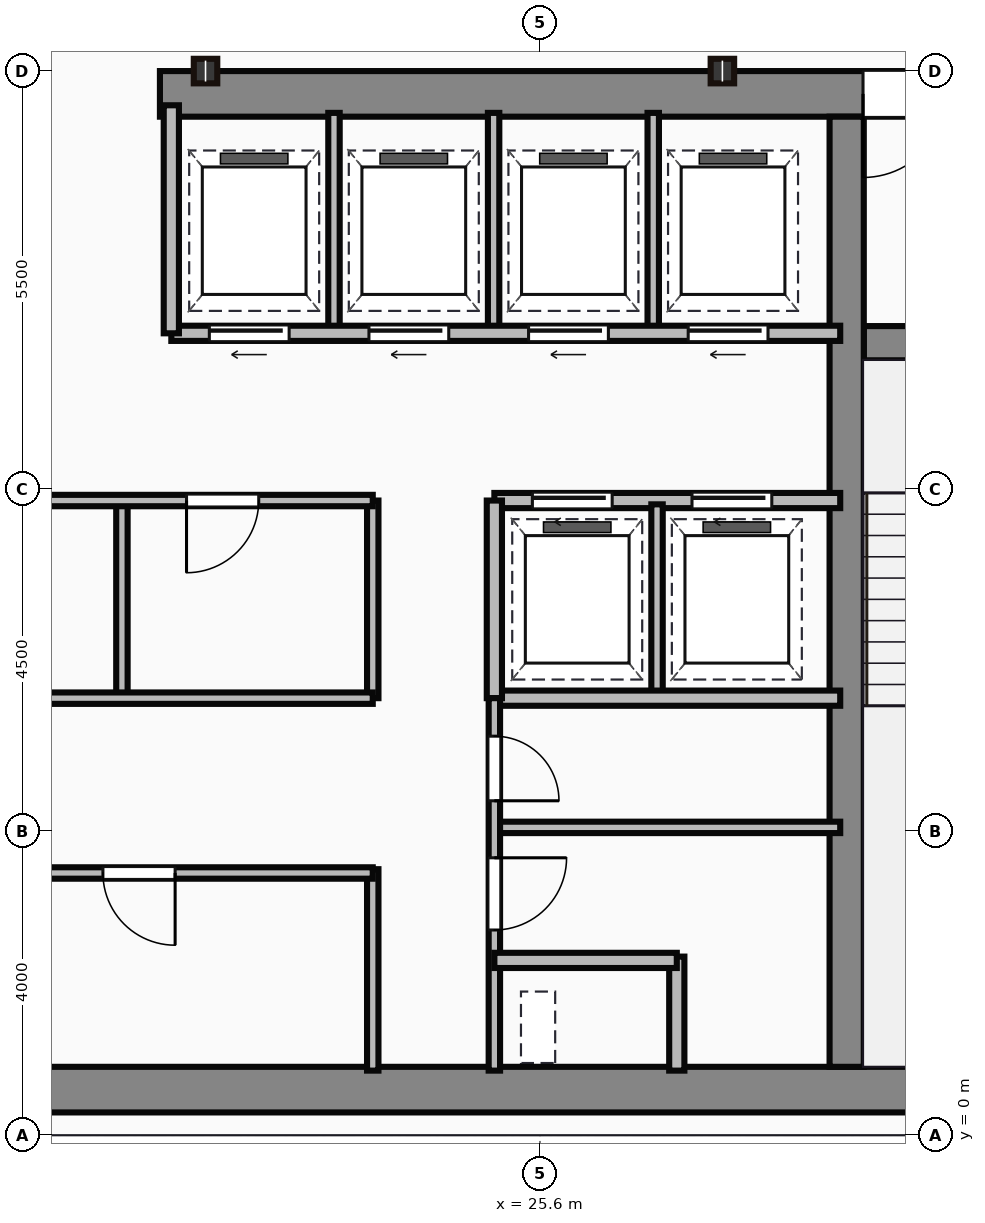
"""IFC4 building model, lengths in metres.
Left out: names, types, materials, properties, quantities, classifications, styles, units other than length and angle.
Written with IfcOpenShell. Run it as: python <this file> out.ifc"""

import sys

from ifc_helpers import new_model, si_unit, direction, frame, frame_2d, origin, origin_2d, place, context, subcontext, project, spatial, rectangle, i_section, extrude, source, transform, mapped, element, fill, save


model = new_model("IFC4")
c1 = context("Model", 3, precision=1e-05, world=origin(), true_north=direction((0.0, 1.0)))
c2 = subcontext(c1, "Body", "Model", "MODEL_VIEW")
j1 = project(units=[si_unit("LENGTHUNIT", "METRE"), si_unit("PLANEANGLEUNIT", "RADIAN")], contexts=[c1])
p1 = place(None, origin())
s1 = spatial("IfcSite", under=j1, at=p1, CompositionType="ELEMENT")
p2 = place(p1, origin())
s2 = spatial("IfcBuilding", under=s1, at=p2, CompositionType="ELEMENT")
p3 = place(p2, frame((0.0, 0.0, 195.9)))
s3 = spatial("IfcBuildingStorey", under=s2, at=p3, CompositionType="ELEMENT", Elevation=195.9)
m1 = source(origin(), c2, "Body", "SweptSolid", [
    extrude(rectangle(XDim=29.5, YDim=0.6, at=frame_2d((14.75, 0.0))), origin(), (0.0, 0.0, 1.0), 3.65),
])
p4 = place(p3, frame((4.5, 0.6, 0.0), z_axis=(0.0, 0.0, 1.0), x_axis=(1.0, 0.0, 0.0)))
e1 = element("IfcWall", 1, at=p4, inside=s3, PredefinedType="SHEAR", context=c2, shape_type="MappedRepresentation", body=[
    mapped(m1, transform((0.0, 0.0, 0.0))),
])
m2 = source(origin(), c2, "Body", "SweptSolid", [
    extrude(rectangle(XDim=12.6, YDim=0.6, at=frame_2d((6.3, 0.0))), origin(), (0.0, 0.0, 1.0), 3.65),
])
p5 = place(p3, frame((20.6, 13.7, 0.0), z_axis=(0.0, 0.0, 1.0), x_axis=(1.0, 0.0, 0.0)))
e2 = element("IfcWall", 2, at=p5, inside=s3, PredefinedType="SHEAR", context=c2, shape_type="MappedRepresentation", body=[
    mapped(m2, transform((0.0, 0.0, 0.0))),
])
p6 = place(p5, frame((9.25, 0.0, 0.0)))
e3 = element("IfcOpeningElement", 3, at=p6, cuts=e2, PredefinedType="OPENING", context=c2, shape_type="SweptSolid", body=[
    extrude(rectangle(XDim=1.1, YDim=2.15, at=frame_2d((0.55, 1.075))), frame((0.0, 0.31, 0.0), z_axis=(0.0, -1.0, 0.0), x_axis=(1.0, 0.0, 0.0)), (0.0, 0.0, 1.0), 0.62),
])
m3 = source(origin(), c2, "Body", "SweptSolid", [
    extrude(rectangle(XDim=12.5, YDim=0.45, at=frame_2d((6.25, 0.0))), origin(), (0.0, 0.0, 1.0), 3.65),
])
p7 = place(p3, frame((29.635, 0.9, 0.0), z_axis=(0.0, 0.0, 1.0), x_axis=(0.0, 1.0, 0.0)))
e4 = element("IfcWall", 4, at=p7, inside=s3, PredefinedType="SHEAR", context=c2, shape_type="MappedRepresentation", body=[
    mapped(m3, transform((0.0, 0.0, 0.0))),
])
m4 = source(origin(), c2, "Body", "SweptSolid", [
    extrude(rectangle(XDim=3.39, YDim=0.45, at=frame_2d((1.695, 0.0))), origin(), (0.0, 0.0, 1.0), 3.65),
])
p8 = place(p3, frame((29.86, 10.42, 0.0), z_axis=(0.0, 0.0, 1.0), x_axis=(1.0, 0.0, 0.0)))
e5 = element("IfcWall", 5, at=p8, inside=s3, PredefinedType="SHEAR", context=c2, shape_type="MappedRepresentation", body=[
    mapped(m4, transform((0.0, 0.0, 0.0))),
])
p9 = place(p8, frame((1.1, 0.0, 0.0)))
e6 = element("IfcOpeningElement", 6, at=p9, cuts=e5, PredefinedType="OPENING", context=c2, shape_type="SweptSolid", body=[
    extrude(rectangle(XDim=1.1, YDim=2.15, at=frame_2d((0.55, 1.075))), frame((0.0, 0.235, 0.0), z_axis=(0.0, -1.0, 0.0), x_axis=(1.0, 0.0, 0.0)), (0.0, 0.0, 1.0), 0.47),
])
m5 = source(origin(), c2, "Body", "SweptSolid", [
    extrude(i_section(OverallWidth=0.309, OverallDepth=0.323, WebThickness=0.014, FlangeThickness=0.023, at=origin_2d()), origin(), (0.0, 0.0, 1.0), 3.65),
])
for number, where, z_axis, x_axis in (
    (7, (21.2, 14.0, 0.0), (0.0, 0.0, 1.0), (1.0, 0.0, 0.0)),
    (8, (28.0, 14.0, 0.0), (0.0, 0.0, 1.0), (1.0, 0.0, 0.0)),
):
    element("IfcColumn", number, at=place(p3, frame(where, z_axis=z_axis, x_axis=x_axis)), inside=s3, PredefinedType="COLUMN", context=c2, shape_type="MappedRepresentation", body=[
        mapped(m5, transform((0.0, 0.0, 0.0))),
    ])
m6 = source(origin(), c2, "Body", "SweptSolid", [
    extrude(rectangle(XDim=10.35, YDim=0.15, at=frame_2d((5.175, 0.0))), origin(), (0.0, 0.0, 1.0), 3.4),
])
p10 = place(p3, frame((13.05, 3.45, 0.0), z_axis=(0.0, 0.0, 1.0), x_axis=(1.0, 0.0, 0.0)))
e9 = element("IfcWall", 9, at=p10, inside=s3, PredefinedType="PARTITIONING", context=c2, shape_type="MappedRepresentation", body=[
    mapped(m6, transform((0.0, 0.0, 0.0))),
])
p11 = place(p10, frame((0.25, 0.0, 0.0)))
e10 = element("IfcOpeningElement", 10, at=p11, cuts=e9, PredefinedType="OPENING", context=c2, shape_type="SweptSolid", body=[
    extrude(rectangle(XDim=0.95, YDim=2.15, at=frame_2d((0.475, 1.075))), frame((0.0, 0.085, 0.0), z_axis=(0.0, -1.0, 0.0), x_axis=(1.0, 0.0, 0.0)), (0.0, 0.0, 1.0), 0.17),
])
p12 = place(p10, frame((6.8, 0.0, 0.0)))
e11 = element("IfcOpeningElement", 11, at=p12, cuts=e9, PredefinedType="OPENING", context=c2, shape_type="SweptSolid", body=[
    extrude(rectangle(XDim=0.95, YDim=2.15, at=frame_2d((0.475, 1.075))), frame((0.0, 0.085, 0.0), z_axis=(0.0, -1.0, 0.0), x_axis=(1.0, 0.0, 0.0)), (0.0, 0.0, 1.0), 0.17),
])
m7 = source(origin(), c2, "Body", "SweptSolid", [
    extrude(rectangle(XDim=2.65, YDim=0.15, at=frame_2d((1.325, 0.0))), origin(), (0.0, 0.0, 1.0), 3.4),
])
p13 = place(p3, frame((23.4, 0.85, 0.0), z_axis=(0.0, 0.0, 1.0), x_axis=(0.0, 1.0, 0.0)))
e12 = element("IfcWall", 12, at=p13, inside=s3, PredefinedType="PARTITIONING", context=c2, shape_type="MappedRepresentation", body=[
    mapped(m7, transform((0.0, 0.0, 0.0))),
])
m8 = source(origin(), c2, "Body", "SweptSolid", [
    extrude(rectangle(XDim=11.85, YDim=0.15, at=frame_2d((5.925, 0.0))), origin(), (0.0, 0.0, 1.0), 3.4),
])
p14 = place(p3, frame((11.55, 5.75, 0.0), z_axis=(0.0, 0.0, 1.0), x_axis=(1.0, 0.0, 0.0)))
e13 = element("IfcWall", 13, at=p14, inside=s3, PredefinedType="PARTITIONING", context=c2, shape_type="MappedRepresentation", body=[
    mapped(m8, transform((0.0, 0.0, 0.0))),
])
p15 = place(p3, frame((11.55, 8.35, 0.0), z_axis=(0.0, 0.0, 1.0), x_axis=(1.0, 0.0, 0.0)))
e14 = element("IfcWall", 14, at=p15, inside=s3, PredefinedType="PARTITIONING", context=c2, shape_type="MappedRepresentation", body=[
    mapped(m8, transform((0.0, 0.0, 0.0))),
])
p16 = place(p15, frame((1.1, 0.0, 0.0)))
e15 = element("IfcOpeningElement", 15, at=p16, cuts=e14, PredefinedType="OPENING", context=c2, shape_type="SweptSolid", body=[
    extrude(rectangle(XDim=0.95, YDim=2.15, at=frame_2d((0.475, 1.075))), frame((0.0, 0.085, 0.0), z_axis=(0.0, -1.0, 0.0), x_axis=(1.0, 0.0, 0.0)), (0.0, 0.0, 1.0), 0.17),
])
p17 = place(p15, frame((9.4, 0.0, 0.0)))
e16 = element("IfcOpeningElement", 16, at=p17, cuts=e14, PredefinedType="OPENING", context=c2, shape_type="SweptSolid", body=[
    extrude(rectangle(XDim=0.95, YDim=2.15, at=frame_2d((0.475, 1.075))), frame((0.0, 0.085, 0.0), z_axis=(0.0, -1.0, 0.0), x_axis=(1.0, 0.0, 0.0)), (0.0, 0.0, 1.0), 0.17),
])
m9 = source(origin(), c2, "Body", "SweptSolid", [
    extrude(rectangle(XDim=2.6, YDim=0.15, at=frame_2d((1.3, 0.0))), origin(), (0.0, 0.0, 1.0), 3.4),
])
p18 = place(p3, frame((23.4, 5.75, 0.0), z_axis=(0.0, 0.0, 1.0), x_axis=(0.0, 1.0, 0.0)))
e17 = element("IfcWall", 17, at=p18, inside=s3, PredefinedType="PARTITIONING", context=c2, shape_type="MappedRepresentation", body=[
    mapped(m9, transform((0.0, 0.0, 0.0))),
])
m10 = source(origin(), c2, "Body", "SweptSolid", [
    extrude(rectangle(XDim=2.5, YDim=0.15, at=frame_2d((1.25, 0.0))), origin(), (0.0, 0.0, 1.0), 3.4),
])
p19 = place(p3, frame((20.1, 5.8, 0.0), z_axis=(0.0, 0.0, 1.0), x_axis=(0.0, 1.0, 0.0)))
e18 = element("IfcWall", 18, at=p19, inside=s3, PredefinedType="PARTITIONING", context=c2, shape_type="MappedRepresentation", body=[
    mapped(m10, transform((0.0, 0.0, 0.0))),
])
m11 = source(origin(), c2, "Body", "SweptSolid", [
    extrude(rectangle(XDim=8.8, YDim=0.2, at=frame_2d((4.4, 0.0))), origin(), (0.0, 0.0, 1.0), 3.4),
])
p20 = place(p3, frame((20.75, 10.55, 0.0), z_axis=(0.0, 0.0, 1.0), x_axis=(1.0, 0.0, 0.0)))
e19 = element("IfcWall", 19, at=p20, inside=s3, PredefinedType="PARTITIONING", context=c2, shape_type="MappedRepresentation", body=[
    mapped(m11, transform((0.0, 0.0, 0.0))),
])
p21 = place(p20, frame((0.5, 0.0, 0.0)))
e20 = element("IfcOpeningElement", 20, at=p21, cuts=e19, PredefinedType="OPENING", context=c2, shape_type="SweptSolid", body=[
    extrude(rectangle(XDim=1.05, YDim=2.15, at=frame_2d((0.525, 1.075))), frame((0.0, 0.11, 0.0), z_axis=(0.0, -1.0, 0.0), x_axis=(1.0, 0.0, 0.0)), (0.0, 0.0, 1.0), 0.22),
])
p22 = place(p20, frame((2.6, 0.0, 0.0)))
e21 = element("IfcOpeningElement", 21, at=p22, cuts=e19, PredefinedType="OPENING", context=c2, shape_type="SweptSolid", body=[
    extrude(rectangle(XDim=1.05, YDim=2.15, at=frame_2d((0.525, 1.075))), frame((0.0, 0.11, 0.0), z_axis=(0.0, -1.0, 0.0), x_axis=(1.0, 0.0, 0.0)), (0.0, 0.0, 1.0), 0.22),
])
p23 = place(p20, frame((4.7, 0.0, 0.0)))
e22 = element("IfcOpeningElement", 22, at=p23, cuts=e19, PredefinedType="OPENING", context=c2, shape_type="SweptSolid", body=[
    extrude(rectangle(XDim=1.05, YDim=2.15, at=frame_2d((0.525, 1.075))), frame((0.0, 0.11, 0.0), z_axis=(0.0, -1.0, 0.0), x_axis=(1.0, 0.0, 0.0)), (0.0, 0.0, 1.0), 0.22),
])
p24 = place(p20, frame((6.8, 0.0, 0.0)))
e23 = element("IfcOpeningElement", 23, at=p24, cuts=e19, PredefinedType="OPENING", context=c2, shape_type="SweptSolid", body=[
    extrude(rectangle(XDim=1.05, YDim=2.15, at=frame_2d((0.525, 1.075))), frame((0.0, 0.11, 0.0), z_axis=(0.0, -1.0, 0.0), x_axis=(1.0, 0.0, 0.0)), (0.0, 0.0, 1.0), 0.22),
])
m12 = source(origin(), c2, "Body", "SweptSolid", [
    extrude(rectangle(XDim=3.0, YDim=0.2, at=frame_2d((1.5, 0.0))), origin(), (0.0, 0.0, 1.0), 3.4),
])
p25 = place(p3, frame((20.75, 10.55, 0.0), z_axis=(0.0, 0.0, 1.0), x_axis=(0.0, 1.0, 0.0)))
e24 = element("IfcWall", 24, at=p25, inside=s3, PredefinedType="PARTITIONING", context=c2, shape_type="MappedRepresentation", body=[
    mapped(m12, transform((0.0, 0.0, 0.0))),
])
m13 = source(origin(), c2, "Body", "SweptSolid", [
    extrude(rectangle(XDim=2.85, YDim=0.15, at=frame_2d((1.425, 0.0))), origin(), (0.0, 0.0, 1.0), 3.4),
])
for number, where, z_axis, x_axis in (
    (25, (22.89, 10.6, 0.0), (0.0, 0.0, 1.0), (0.0, 1.0, 0.0)),
    (26, (24.99, 10.6, 0.0), (0.0, 0.0, 1.0), (0.0, 1.0, 0.0)),
    (27, (27.09, 10.6, 0.0), (0.0, 0.0, 1.0), (0.0, 1.0, 0.0)),
):
    element("IfcWall", number, at=place(p3, frame(where, z_axis=z_axis, x_axis=x_axis)), inside=s3, PredefinedType="PARTITIONING", context=c2, shape_type="MappedRepresentation", body=[
        mapped(m13, transform((0.0, 0.0, 0.0))),
    ])
m14 = source(origin(), c2, "Body", "SweptSolid", [
    extrude(rectangle(XDim=4.55, YDim=0.2, at=frame_2d((2.275, 0.0))), origin(), (0.0, 0.0, 1.0), 3.4),
])
p26 = place(p3, frame((25.0, 8.35, 0.0), z_axis=(0.0, 0.0, 1.0), x_axis=(1.0, 0.0, 0.0)))
e28 = element("IfcWall", 28, at=p26, inside=s3, PredefinedType="PARTITIONING", context=c2, shape_type="MappedRepresentation", body=[
    mapped(m14, transform((0.0, 0.0, 0.0))),
])
p27 = place(p26, frame((0.5, 0.0, 0.0)))
e29 = element("IfcOpeningElement", 29, at=p27, cuts=e28, PredefinedType="OPENING", context=c2, shape_type="SweptSolid", body=[
    extrude(rectangle(XDim=1.05, YDim=2.15, at=frame_2d((0.525, 1.075))), frame((0.0, 0.11, 0.0), z_axis=(0.0, -1.0, 0.0), x_axis=(1.0, 0.0, 0.0)), (0.0, 0.0, 1.0), 0.22),
])
p28 = place(p26, frame((2.6, 0.0, 0.0)))
e30 = element("IfcOpeningElement", 30, at=p28, cuts=e28, PredefinedType="OPENING", context=c2, shape_type="SweptSolid", body=[
    extrude(rectangle(XDim=1.05, YDim=2.15, at=frame_2d((0.525, 1.075))), frame((0.0, 0.11, 0.0), z_axis=(0.0, -1.0, 0.0), x_axis=(1.0, 0.0, 0.0)), (0.0, 0.0, 1.0), 0.22),
])
p29 = place(p3, frame((25.0, 5.75, 0.0), z_axis=(0.0, 0.0, 1.0), x_axis=(1.0, 0.0, 0.0)))
e31 = element("IfcWall", 31, at=p29, inside=s3, PredefinedType="PARTITIONING", context=c2, shape_type="MappedRepresentation", body=[
    mapped(m14, transform((0.0, 0.0, 0.0))),
])
m15 = source(origin(), c2, "Body", "SweptSolid", [
    extrude(rectangle(XDim=2.6, YDim=0.2, at=frame_2d((1.3, 0.0))), origin(), (0.0, 0.0, 1.0), 3.4),
])
p30 = place(p3, frame((25.0, 5.75, 0.0), z_axis=(0.0, 0.0, 1.0), x_axis=(0.0, 1.0, 0.0)))
e32 = element("IfcWall", 32, at=p30, inside=s3, PredefinedType="PARTITIONING", context=c2, shape_type="MappedRepresentation", body=[
    mapped(m15, transform((0.0, 0.0, 0.0))),
])
p31 = place(p3, frame((27.14, 5.8, 0.0), z_axis=(0.0, 0.0, 1.0), x_axis=(0.0, 1.0, 0.0)))
e33 = element("IfcWall", 33, at=p31, inside=s3, PredefinedType="PARTITIONING", context=c2, shape_type="MappedRepresentation", body=[
    mapped(m10, transform((0.0, 0.0, 0.0))),
])
m16 = source(origin(), c2, "Body", "SweptSolid", [
    extrude(rectangle(XDim=4.9, YDim=0.15, at=frame_2d((2.45, 0.0))), origin(), (0.0, 0.0, 1.0), 3.4),
])
p32 = place(p3, frame((25.0, 0.85, 0.0), z_axis=(0.0, 0.0, 1.0), x_axis=(0.0, 1.0, 0.0)))
e34 = element("IfcWall", 34, at=p32, inside=s3, PredefinedType="PARTITIONING", context=c2, shape_type="MappedRepresentation", body=[
    mapped(m16, transform((0.0, 0.0, 0.0))),
])
p33 = place(p32, frame((1.85, 0.0, 0.0)))
e35 = element("IfcOpeningElement", 35, at=p33, cuts=e34, PredefinedType="OPENING", context=c2, shape_type="SweptSolid", body=[
    extrude(rectangle(XDim=0.95, YDim=2.15, at=frame_2d((0.475, 1.075))), frame((0.0, 0.085, 0.0), z_axis=(0.0, -1.0, 0.0), x_axis=(1.0, 0.0, 0.0)), (0.0, 0.0, 1.0), 0.17),
])
p34 = place(p32, frame((3.55, 0.0, 0.0)))
e36 = element("IfcOpeningElement", 36, at=p34, cuts=e34, PredefinedType="OPENING", context=c2, shape_type="SweptSolid", body=[
    extrude(rectangle(XDim=0.85, YDim=2.15, at=frame_2d((0.425, 1.075))), frame((0.0, 0.085, 0.0), z_axis=(0.0, -1.0, 0.0), x_axis=(1.0, 0.0, 0.0)), (0.0, 0.0, 1.0), 0.17),
])
m17 = source(origin(), c2, "Body", "SweptSolid", [
    extrude(rectangle(XDim=2.4, YDim=0.2, at=frame_2d((1.2, 0.0))), origin(), (0.0, 0.0, 1.0), 3.4),
])
p35 = place(p3, frame((25.0, 2.3, 0.0), z_axis=(0.0, 0.0, 1.0), x_axis=(1.0, 0.0, 0.0)))
e37 = element("IfcWall", 37, at=p35, inside=s3, PredefinedType="PARTITIONING", context=c2, shape_type="MappedRepresentation", body=[
    mapped(m17, transform((0.0, 0.0, 0.0))),
])
m18 = source(origin(), c2, "Body", "SweptSolid", [
    extrude(rectangle(XDim=1.5, YDim=0.2, at=frame_2d((0.75, 0.0))), origin(), (0.0, 0.0, 1.0), 3.4),
])
p36 = place(p3, frame((27.4, 0.85, 0.0), z_axis=(0.0, 0.0, 1.0), x_axis=(0.0, 1.0, 0.0)))
e38 = element("IfcWall", 38, at=p36, inside=s3, PredefinedType="PARTITIONING", context=c2, shape_type="MappedRepresentation", body=[
    mapped(m18, transform((0.0, 0.0, 0.0))),
])
m19 = source(origin(), c2, "Body", "SweptSolid", [
    extrude(rectangle(XDim=4.55, YDim=0.15, at=frame_2d((2.275, 0.0))), origin(), (0.0, 0.0, 1.0), 3.4),
])
p37 = place(p3, frame((25.0, 4.05, 0.0), z_axis=(0.0, 0.0, 1.0), x_axis=(1.0, 0.0, 0.0)))
e39 = element("IfcWall", 39, at=p37, inside=s3, PredefinedType="PARTITIONING", context=c2, shape_type="MappedRepresentation", body=[
    mapped(m19, transform((0.0, 0.0, 0.0))),
])
m20 = source(origin(), c2, "Body", "SweptSolid", [
    extrude(rectangle(XDim=1.1, YDim=2.15, at=frame_2d((0.55, 1.075))), frame((0.0, 0.025, 0.0), z_axis=(0.0, -1.0, 0.0), x_axis=(1.0, 0.0, 0.0)), (0.0, 0.0, 1.0), 0.05),
])
p38 = place(p6, origin())
e40 = element("IfcDoor", 40, at=p38, inside=s3, OperationType="SINGLE_SWING_LEFT", PredefinedType="DOOR", context=c2, shape_type="MappedRepresentation", body=[
    mapped(m20, transform((0.0, 0.0, 0.0))),
])
fill(e3, e40)
m21 = source(origin(), c2, "Body", "SweptSolid", [
    extrude(rectangle(XDim=0.95, YDim=2.15, at=frame_2d((0.475, 1.075))), frame((0.0, 0.025, 0.0), z_axis=(0.0, -1.0, 0.0), x_axis=(1.0, 0.0, 0.0)), (0.0, 0.0, 1.0), 0.05),
])
p39 = place(p12, origin())
e41 = element("IfcDoor", 41, at=p39, inside=s3, OperationType="SINGLE_SWING_RIGHT", PredefinedType="DOOR", context=c2, shape_type="MappedRepresentation", body=[
    mapped(m21, transform((0.0, 0.0, 0.0))),
])
fill(e11, e41)
p40 = place(p17, origin())
e42 = element("IfcDoor", 42, at=p40, inside=s3, OperationType="SINGLE_SWING_LEFT", PredefinedType="DOOR", context=c2, shape_type="MappedRepresentation", body=[
    mapped(m21, transform((0.0, 0.0, 0.0))),
])
fill(e16, e42)
m22 = source(origin(), c2, "Body", "SweptSolid", [
    extrude(rectangle(XDim=1.05, YDim=2.15, at=frame_2d((0.525, 1.075))), frame((0.0, 0.025, 0.0), z_axis=(0.0, -1.0, 0.0), x_axis=(1.0, 0.0, 0.0)), (0.0, 0.0, 1.0), 0.05),
])
p41 = place(p21, frame((1.05, 0.0, 0.0), z_axis=(0.0, 0.0, 1.0), x_axis=(-1.0, 0.0, 0.0)))
e43 = element("IfcDoor", 43, at=p41, inside=s3, OperationType="SLIDING_TO_LEFT", PredefinedType="DOOR", context=c2, shape_type="MappedRepresentation", body=[
    mapped(m22, transform((0.0, 0.0, 0.0))),
])
fill(e20, e43)
p42 = place(p22, frame((1.05, 0.0, 0.0), z_axis=(0.0, 0.0, 1.0), x_axis=(-1.0, 0.0, 0.0)))
e44 = element("IfcDoor", 44, at=p42, inside=s3, OperationType="SLIDING_TO_LEFT", PredefinedType="DOOR", context=c2, shape_type="MappedRepresentation", body=[
    mapped(m22, transform((0.0, 0.0, 0.0))),
])
fill(e21, e44)
p43 = place(p23, frame((1.05, 0.0, 0.0), z_axis=(0.0, 0.0, 1.0), x_axis=(-1.0, 0.0, 0.0)))
e45 = element("IfcDoor", 45, at=p43, inside=s3, OperationType="SLIDING_TO_LEFT", PredefinedType="DOOR", context=c2, shape_type="MappedRepresentation", body=[
    mapped(m22, transform((0.0, 0.0, 0.0))),
])
fill(e22, e45)
p44 = place(p24, frame((1.05, 0.0, 0.0), z_axis=(0.0, 0.0, 1.0), x_axis=(-1.0, 0.0, 0.0)))
e46 = element("IfcDoor", 46, at=p44, inside=s3, OperationType="SLIDING_TO_LEFT", PredefinedType="DOOR", context=c2, shape_type="MappedRepresentation", body=[
    mapped(m22, transform((0.0, 0.0, 0.0))),
])
fill(e23, e46)
p45 = place(p27, origin())
e47 = element("IfcDoor", 47, at=p45, inside=s3, OperationType="SLIDING_TO_LEFT", PredefinedType="DOOR", context=c2, shape_type="MappedRepresentation", body=[
    mapped(m22, transform((0.0, 0.0, 0.0))),
])
fill(e29, e47)
p46 = place(p28, origin())
e48 = element("IfcDoor", 48, at=p46, inside=s3, OperationType="SLIDING_TO_LEFT", PredefinedType="DOOR", context=c2, shape_type="MappedRepresentation", body=[
    mapped(m22, transform((0.0, 0.0, 0.0))),
])
fill(e30, e48)
p47 = place(p33, origin())
e49 = element("IfcDoor", 49, at=p47, inside=s3, OperationType="SINGLE_SWING_RIGHT", PredefinedType="DOOR", context=c2, shape_type="MappedRepresentation", body=[
    mapped(m21, transform((0.0, 0.0, 0.0))),
])
fill(e35, e49)
m23 = source(origin(), c2, "Body", "SweptSolid", [
    extrude(rectangle(XDim=0.85, YDim=2.15, at=frame_2d((0.425, 1.075))), frame((0.0, 0.025, 0.0), z_axis=(0.0, -1.0, 0.0), x_axis=(1.0, 0.0, 0.0)), (0.0, 0.0, 1.0), 0.05),
])
p48 = place(p34, origin())
e50 = element("IfcDoor", 50, at=p48, inside=s3, OperationType="SINGLE_SWING_LEFT", PredefinedType="DOOR", context=c2, shape_type="MappedRepresentation", body=[
    mapped(m23, transform((0.0, 0.0, 0.0))),
])
fill(e36, e50)
save(model, sys.argv[1])
